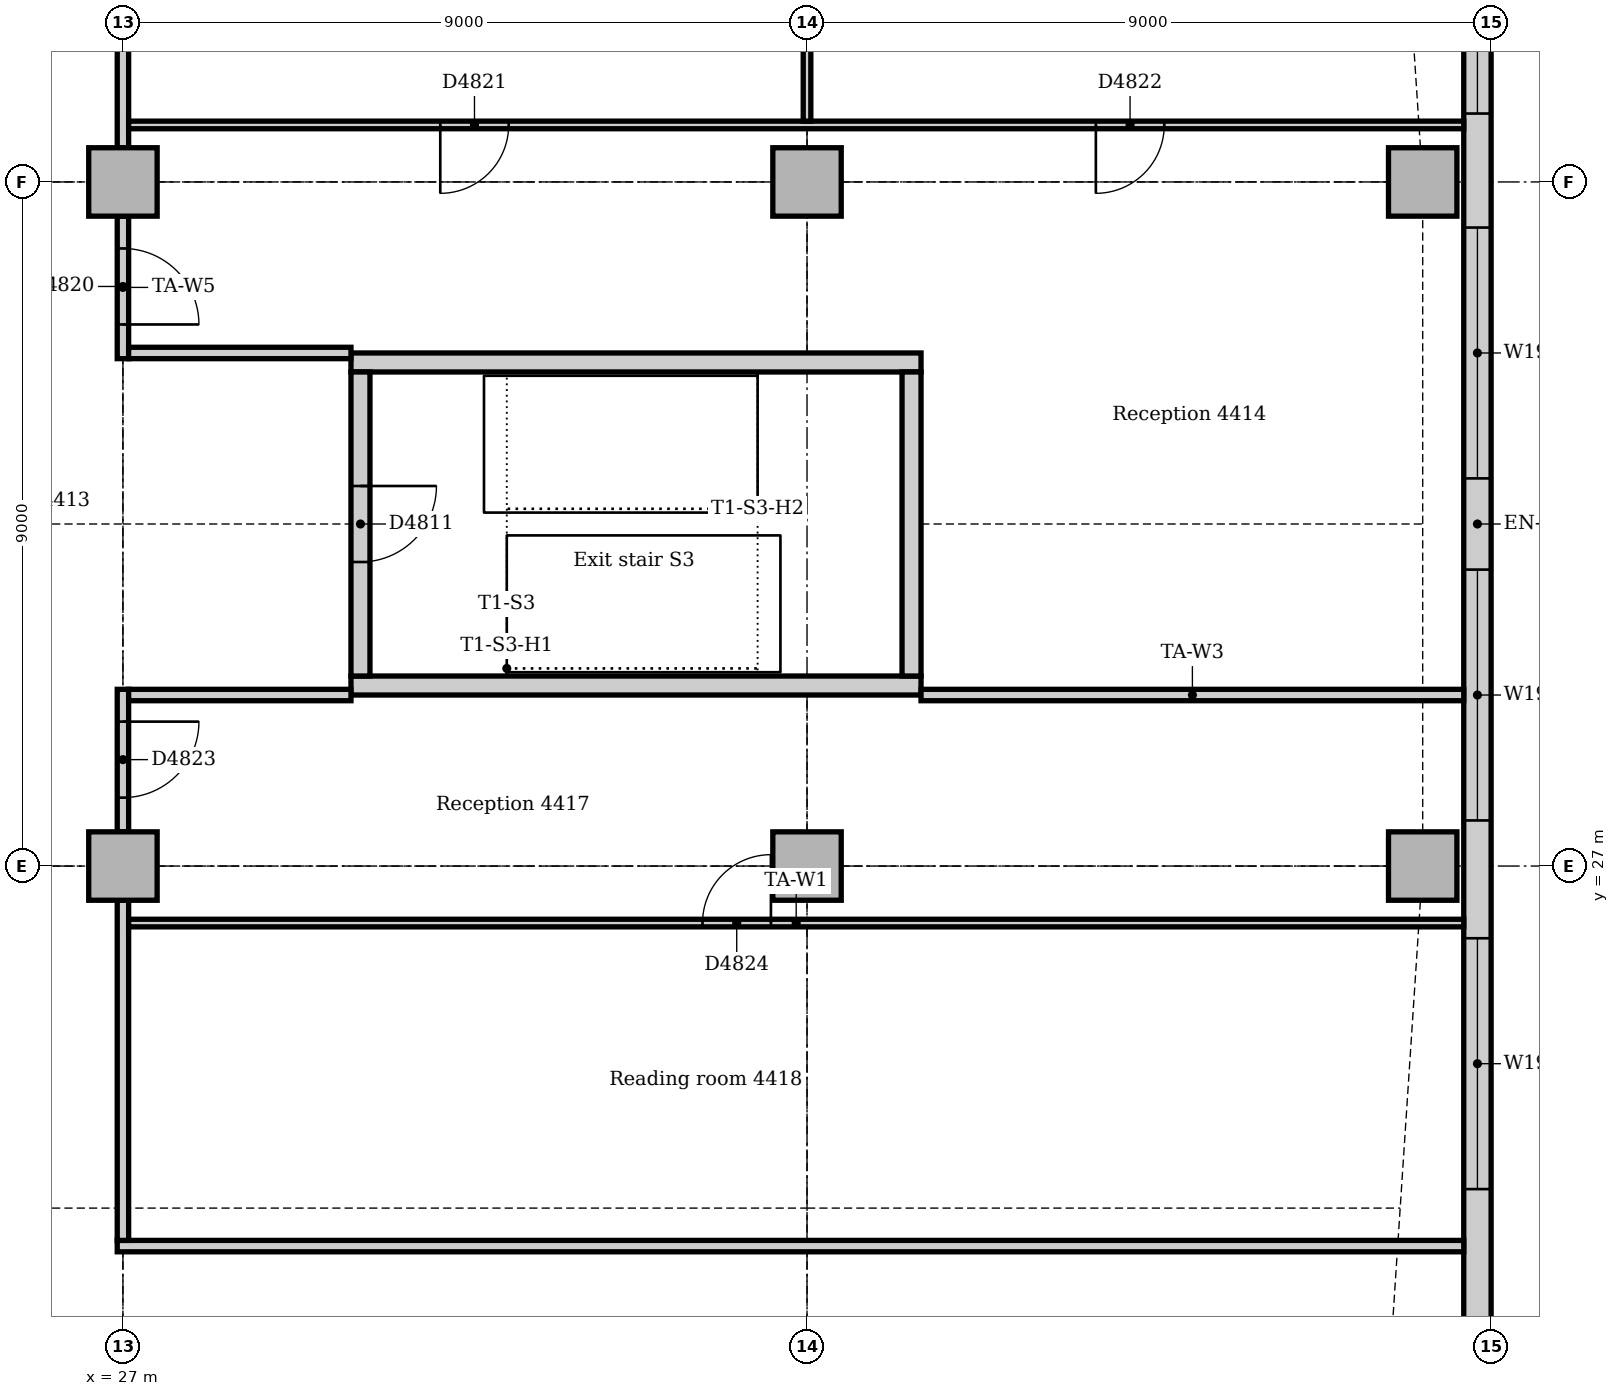
"""IFC4 building model, lengths in metres.
Left out: names, types, materials, properties, quantities, classifications, styles, units other than length and angle.
Written with IfcOpenShell. Run it as: python <this file> out.ifc"""

import sys

from ifc_helpers import new_model, si_unit, direction, frame, frame_2d, origin, origin_2d, place, context, subcontext, project, spatial, rectangle, extrude, element, fill, save


model = new_model("IFC4")
c1 = context("Model", 3, precision=1e-05, world=origin(), true_north=direction((0.0, 1.0)))
c2 = subcontext(c1, "Body", "Model", "MODEL_VIEW")
j1 = project(units=[si_unit("LENGTHUNIT", "METRE"), si_unit("PLANEANGLEUNIT", "RADIAN")], contexts=[c1])
p1 = place(None, origin())
s1 = spatial("IfcSite", under=j1, at=p1, CompositionType="ELEMENT")
p2 = place(p1, origin())
s2 = spatial("IfcBuilding", under=s1, at=p2, CompositionType="ELEMENT")
p3 = place(p2, frame((0.0, 0.0, 185.0)))
s3 = spatial("IfcBuildingStorey", under=s2, at=p3, CompositionType="ELEMENT", Elevation=185.0)
for number, where, z_axis, x_axis in (
    (1, (30.0, 29.375, 0.0), (0.0, 0.0, 1.0), (1.0, 0.0, 0.0)),
    (2, (37.5, 33.625, 0.0), (0.0, 0.0, 1.0), (-1.0, 0.0, 0.0)),
):
    element("IfcWall", number, at=place(p3, frame(where, z_axis=z_axis, x_axis=x_axis)), inside=s3, PredefinedType="SOLIDWALL", context=c2, shape_type="SweptSolid", body=[
        extrude(rectangle(XDim=7.5, YDim=0.25, at=frame_2d((3.75, 0.0))), origin(), (0.0, 0.0, 1.0), 4.0),
    ])
p4 = place(p3, frame((37.375, 29.5, 0.0), z_axis=(0.0, 0.0, 1.0), x_axis=(0.0, 1.0, 0.0)))
e3 = element("IfcWall", 3, at=p4, inside=s3, PredefinedType="SOLIDWALL", context=c2, shape_type="SweptSolid", body=[
    extrude(rectangle(XDim=4.0, YDim=0.25, at=frame_2d((2.0, 0.0))), origin(), (0.0, 0.0, 1.0), 4.0),
])
p5 = place(p3, frame((30.125, 33.5, 0.0), z_axis=(0.0, 0.0, 1.0), x_axis=(0.0, -1.0, 0.0)))
e4 = element("IfcWall", 4, at=p5, inside=s3, PredefinedType="SOLIDWALL", context=c2, shape_type="SweptSolid", body=[
    extrude(rectangle(XDim=4.0, YDim=0.25, at=frame_2d((2.0, 0.0))), origin(), (0.0, 0.0, 1.0), 4.0),
])
p6 = place(p5, frame((1.5, 0.0, 0.0)))
e5 = element("IfcOpeningElement", 5, at=p6, cuts=e4, PredefinedType="OPENING", context=c2, shape_type="SweptSolid", body=[
    extrude(rectangle(XDim=1.0, YDim=2.1, at=frame_2d((0.5, 1.05))), frame((0.0, 0.135, 0.0), z_axis=(0.0, -1.0, 0.0), x_axis=(1.0, 0.0, 0.0)), (0.0, 0.0, 1.0), 0.27),
])
for number, where, z_axis, x_axis in (
    (6, (44.1, 27.0, 0.0), (0.0, 0.0, 1.0), (1.0, 0.0, 0.0)),
    (7, (44.1, 36.0, 0.0), (0.0, 0.0, 1.0), (1.0, 0.0, 0.0)),
    (8, (27.0, 27.0, 0.0), (0.0, 0.0, 1.0), (1.0, 0.0, 0.0)),
    (9, (27.0, 36.0, 0.0), (0.0, 0.0, 1.0), (1.0, 0.0, 0.0)),
    (10, (36.0, 27.0, 0.0), (0.0, 0.0, 1.0), (1.0, 0.0, 0.0)),
    (11, (36.0, 36.0, 0.0), (0.0, 0.0, 1.0), (1.0, 0.0, 0.0)),
):
    element("IfcColumn", number, at=place(p3, frame(where, z_axis=z_axis, x_axis=x_axis)), inside=s3, PredefinedType="COLUMN", context=c2, shape_type="SweptSolid", body=[
        extrude(rectangle(XDim=0.9, YDim=0.9, at=origin_2d()), origin(), (0.0, 0.0, 1.0), 3.85),
    ])
p7 = place(p3, frame((44.82, 19.243, 0.0), z_axis=(0.0, 0.0, 1.0), x_axis=(0.0, 1.0, 0.0)))
e12 = element("IfcWall", 12, at=p7, inside=s3, PredefinedType="STANDARD", context=c2, shape_type="SweptSolid", body=[
    extrude(rectangle(XDim=24.515, YDim=0.36, at=frame_2d((12.257, 0.0))), origin(), (0.0, 0.0, 1.0), 3.85),
])
p8 = place(p7, frame((3.507, 0.0, 0.9)))
e13 = element("IfcOpeningElement", 13, at=p8, cuts=e12, PredefinedType="OPENING", context=c2, shape_type="SweptSolid", body=[
    extrude(rectangle(XDim=3.3, YDim=1.6, at=frame_2d((1.65, 0.8))), frame((0.0, 0.19, 0.0), z_axis=(0.0, -1.0, 0.0), x_axis=(1.0, 0.0, 0.0)), (0.0, 0.0, 1.0), 0.38),
])
p9 = place(p7, frame((8.357, 0.0, 0.9)))
e14 = element("IfcOpeningElement", 14, at=p9, cuts=e12, PredefinedType="OPENING", context=c2, shape_type="SweptSolid", body=[
    extrude(rectangle(XDim=3.3, YDim=1.6, at=frame_2d((1.65, 0.8))), frame((0.0, 0.19, 0.0), z_axis=(0.0, -1.0, 0.0), x_axis=(1.0, 0.0, 0.0)), (0.0, 0.0, 1.0), 0.38),
])
p10 = place(p7, frame((12.857, 0.0, 0.9)))
e15 = element("IfcOpeningElement", 15, at=p10, cuts=e12, PredefinedType="OPENING", context=c2, shape_type="SweptSolid", body=[
    extrude(rectangle(XDim=3.3, YDim=1.6, at=frame_2d((1.65, 0.8))), frame((0.0, 0.19, 0.0), z_axis=(0.0, -1.0, 0.0), x_axis=(1.0, 0.0, 0.0)), (0.0, 0.0, 1.0), 0.38),
])
p11 = place(p7, frame((17.657, 0.0, 0.9)))
e16 = element("IfcOpeningElement", 16, at=p11, cuts=e12, PredefinedType="OPENING", context=c2, shape_type="SweptSolid", body=[
    extrude(rectangle(XDim=3.3, YDim=1.6, at=frame_2d((1.65, 0.8))), frame((0.0, 0.19, 0.0), z_axis=(0.0, -1.0, 0.0), x_axis=(1.0, 0.0, 0.0)), (0.0, 0.0, 1.0), 0.38),
])
p12 = place(p3, frame((26.925, 22.0, 0.0), z_axis=(0.0, 0.0, 1.0), x_axis=(1.0, 0.0, 0.0)))
e17 = element("IfcWall", 17, at=p12, inside=s3, PredefinedType="PARTITIONING", context=c2, shape_type="SweptSolid", body=[
    extrude(rectangle(XDim=17.715, YDim=0.15, at=frame_2d((8.857, 0.0))), origin(), (0.0, 0.0, 1.0), 3.85),
])
p13 = place(p3, frame((27.0, 33.675, 0.0), z_axis=(0.0, 0.0, 1.0), x_axis=(0.0, 1.0, 0.0)))
e18 = element("IfcWall", 18, at=p13, inside=s3, PredefinedType="PARTITIONING", context=c2, shape_type="SweptSolid", body=[
    extrude(rectangle(XDim=1.875, YDim=0.15, at=frame_2d((0.938, 0.0))), origin(), (0.0, 0.0, 1.0), 3.362),
])
p14 = place(p13, frame((0.45, 0.0, 0.0)))
e19 = element("IfcOpeningElement", 19, at=p14, cuts=e18, PredefinedType="OPENING", context=c2, shape_type="SweptSolid", body=[
    extrude(rectangle(XDim=1.0, YDim=2.1, at=frame_2d((0.5, 1.05))), frame((0.0, 0.085, 0.0), z_axis=(0.0, -1.0, 0.0), x_axis=(1.0, 0.0, 0.0)), (0.0, 0.0, 1.0), 0.17),
])
p15 = place(p3, frame((27.0, 36.45, 0.0), z_axis=(0.0, 0.0, 1.0), x_axis=(0.0, 1.0, 0.0)))
e20 = element("IfcWall", 20, at=p15, inside=s3, PredefinedType="PARTITIONING", context=c2, shape_type="SweptSolid", body=[
    extrude(rectangle(XDim=7.2, YDim=0.15, at=frame_2d((3.6, 0.0))), origin(), (0.0, 0.0, 1.0), 3.362),
])
p16 = place(p3, frame((27.0, 22.075, 0.0), z_axis=(0.0, 0.0, 1.0), x_axis=(0.0, 1.0, 0.0)))
e21 = element("IfcWall", 21, at=p16, inside=s3, PredefinedType="PARTITIONING", context=c2, shape_type="SweptSolid", body=[
    extrude(rectangle(XDim=4.475, YDim=0.15, at=frame_2d((2.237, 0.0))), origin(), (0.0, 0.0, 1.0), 3.362),
])
p17 = place(p3, frame((27.0, 27.45, 0.0), z_axis=(0.0, 0.0, 1.0), x_axis=(0.0, 1.0, 0.0)))
e22 = element("IfcWall", 22, at=p17, inside=s3, PredefinedType="PARTITIONING", context=c2, shape_type="SweptSolid", body=[
    extrude(rectangle(XDim=1.875, YDim=0.15, at=frame_2d((0.938, 0.0))), origin(), (0.0, 0.0, 1.0), 3.362),
])
p18 = place(p17, frame((0.45, 0.0, 0.0)))
e23 = element("IfcOpeningElement", 23, at=p18, cuts=e22, PredefinedType="OPENING", context=c2, shape_type="SweptSolid", body=[
    extrude(rectangle(XDim=1.0, YDim=2.1, at=frame_2d((0.5, 1.05))), frame((0.0, 0.085, 0.0), z_axis=(0.0, -1.0, 0.0), x_axis=(1.0, 0.0, 0.0)), (0.0, 0.0, 1.0), 0.17),
])
for number, where, z_axis, x_axis in (
    (24, (27.075, 29.25, 0.0), (0.0, 0.0, 1.0), (1.0, 0.0, 0.0)),
    (25, (27.075, 33.75, 0.0), (0.0, 0.0, 1.0), (1.0, 0.0, 0.0)),
):
    element("IfcWall", number, at=place(p3, frame(where, z_axis=z_axis, x_axis=x_axis)), inside=s3, PredefinedType="PARTITIONING", context=c2, shape_type="SweptSolid", body=[
        extrude(rectangle(XDim=2.925, YDim=0.15, at=frame_2d((1.462, 0.0))), origin(), (0.0, 0.0, 1.0), 3.85),
    ])
p19 = place(p3, frame((37.5, 29.25, 0.0), z_axis=(0.0, 0.0, 1.0), x_axis=(1.0, 0.0, 0.0)))
e26 = element("IfcWall", 26, at=p19, inside=s3, PredefinedType="PARTITIONING", context=c2, shape_type="SweptSolid", body=[
    extrude(rectangle(XDim=7.14, YDim=0.15, at=frame_2d((3.57, 0.0))), origin(), (0.0, 0.0, 1.0), 3.85),
])
p20 = place(p3, frame((27.075, 26.25, 0.0), z_axis=(0.0, 0.0, 1.0), x_axis=(1.0, 0.0, 0.0)))
e27 = element("IfcWall", 27, at=p20, inside=s3, PredefinedType="PARTITIONING", context=c2, shape_type="SweptSolid", body=[
    extrude(rectangle(XDim=17.565, YDim=0.1, at=frame_2d((8.783, 0.0))), origin(), (0.0, 0.0, 1.0), 3.85),
])
p21 = place(p20, frame((7.55, 0.0, 0.0)))
e28 = element("IfcOpeningElement", 28, at=p21, cuts=e27, PredefinedType="OPENING", context=c2, shape_type="SweptSolid", body=[
    extrude(rectangle(XDim=0.9, YDim=2.1, at=frame_2d((0.45, 1.05))), frame((0.0, 0.06, 0.0), z_axis=(0.0, -1.0, 0.0), x_axis=(1.0, 0.0, 0.0)), (0.0, 0.0, 1.0), 0.12),
])
p22 = place(p3, frame((27.075, 36.75, 0.0), z_axis=(0.0, 0.0, 1.0), x_axis=(1.0, 0.0, 0.0)))
e29 = element("IfcWall", 29, at=p22, inside=s3, PredefinedType="PARTITIONING", context=c2, shape_type="SweptSolid", body=[
    extrude(rectangle(XDim=17.565, YDim=0.1, at=frame_2d((8.783, 0.0))), origin(), (0.0, 0.0, 1.0), 3.85),
])
p23 = place(p22, frame((4.1, 0.0, 0.0)))
e30 = element("IfcOpeningElement", 30, at=p23, cuts=e29, PredefinedType="OPENING", context=c2, shape_type="SweptSolid", body=[
    extrude(rectangle(XDim=0.9, YDim=2.1, at=frame_2d((0.45, 1.05))), frame((0.0, 0.06, 0.0), z_axis=(0.0, -1.0, 0.0), x_axis=(1.0, 0.0, 0.0)), (0.0, 0.0, 1.0), 0.12),
])
p24 = place(p22, frame((12.725, 0.0, 0.0)))
e31 = element("IfcOpeningElement", 31, at=p24, cuts=e29, PredefinedType="OPENING", context=c2, shape_type="SweptSolid", body=[
    extrude(rectangle(XDim=0.9, YDim=2.1, at=frame_2d((0.45, 1.05))), frame((0.0, 0.06, 0.0), z_axis=(0.0, -1.0, 0.0), x_axis=(1.0, 0.0, 0.0)), (0.0, 0.0, 1.0), 0.12),
])
p25 = place(p3, frame((36.0, 36.8, 0.0), z_axis=(0.0, 0.0, 1.0), x_axis=(0.0, 1.0, 0.0)))
e32 = element("IfcWall", 32, at=p25, inside=s3, PredefinedType="PARTITIONING", context=c2, shape_type="SweptSolid", body=[
    extrude(rectangle(XDim=6.85, YDim=0.1, at=frame_2d((3.425, 0.0))), origin(), (0.0, 0.0, 1.0), 3.362),
])
p26 = place(p8, origin())
e33 = element("IfcWindow", 33, at=p26, inside=s3, PartitioningType="SINGLE_PANEL", PredefinedType="WINDOW", context=c2, shape_type="SweptSolid", body=[
    extrude(rectangle(XDim=3.3, YDim=1.6, at=frame_2d((1.65, 0.8))), frame((0.0, 0.13, 0.0), z_axis=(0.0, -1.0, 0.0), x_axis=(1.0, 0.0, 0.0)), (0.0, 0.0, 1.0), 0.06),
])
fill(e13, e33)
p27 = place(p9, origin())
e34 = element("IfcWindow", 34, at=p27, inside=s3, PartitioningType="SINGLE_PANEL", PredefinedType="WINDOW", context=c2, shape_type="SweptSolid", body=[
    extrude(rectangle(XDim=3.3, YDim=1.6, at=frame_2d((1.65, 0.8))), frame((0.0, 0.13, 0.0), z_axis=(0.0, -1.0, 0.0), x_axis=(1.0, 0.0, 0.0)), (0.0, 0.0, 1.0), 0.06),
])
fill(e14, e34)
p28 = place(p10, origin())
e35 = element("IfcWindow", 35, at=p28, inside=s3, PartitioningType="SINGLE_PANEL", PredefinedType="WINDOW", context=c2, shape_type="SweptSolid", body=[
    extrude(rectangle(XDim=3.3, YDim=1.6, at=frame_2d((1.65, 0.8))), frame((0.0, 0.13, 0.0), z_axis=(0.0, -1.0, 0.0), x_axis=(1.0, 0.0, 0.0)), (0.0, 0.0, 1.0), 0.06),
])
fill(e15, e35)
p29 = place(p11, origin())
e36 = element("IfcWindow", 36, at=p29, inside=s3, PartitioningType="SINGLE_PANEL", PredefinedType="WINDOW", context=c2, shape_type="SweptSolid", body=[
    extrude(rectangle(XDim=3.3, YDim=1.6, at=frame_2d((1.65, 0.8))), frame((0.0, 0.13, 0.0), z_axis=(0.0, -1.0, 0.0), x_axis=(1.0, 0.0, 0.0)), (0.0, 0.0, 1.0), 0.06),
])
fill(e16, e36)
p30 = place(p6, origin())
e37 = element("IfcDoor", 37, at=p30, inside=s3, OperationType="SINGLE_SWING_LEFT", PredefinedType="DOOR", context=c2, shape_type="SweptSolid", body=[
    extrude(rectangle(XDim=1.0, YDim=2.1, at=frame_2d((0.5, 1.05))), frame((0.0, 0.025, 0.0), z_axis=(0.0, -1.0, 0.0), x_axis=(1.0, 0.0, 0.0)), (0.0, 0.0, 1.0), 0.05),
])
fill(e5, e37)
p31 = place(p14, frame((1.0, 0.0, 0.0), z_axis=(0.0, 0.0, 1.0), x_axis=(-1.0, 0.0, 0.0)))
e38 = element("IfcDoor", 38, at=p31, inside=s3, OperationType="SINGLE_SWING_RIGHT", PredefinedType="DOOR", context=c2, shape_type="SweptSolid", body=[
    extrude(rectangle(XDim=1.0, YDim=2.1, at=frame_2d((0.5, 1.05))), frame((0.0, 0.025, 0.0), z_axis=(0.0, -1.0, 0.0), x_axis=(1.0, 0.0, 0.0)), (0.0, 0.0, 1.0), 0.05),
])
fill(e19, e38)
p32 = place(p23, frame((0.9, 0.0, 0.0), z_axis=(0.0, 0.0, 1.0), x_axis=(-1.0, 0.0, 0.0)))
e39 = element("IfcDoor", 39, at=p32, inside=s3, OperationType="SINGLE_SWING_RIGHT", PredefinedType="DOOR", context=c2, shape_type="SweptSolid", body=[
    extrude(rectangle(XDim=0.9, YDim=2.1, at=frame_2d((0.45, 1.05))), frame((0.0, 0.025, 0.0), z_axis=(0.0, -1.0, 0.0), x_axis=(1.0, 0.0, 0.0)), (0.0, 0.0, 1.0), 0.05),
])
fill(e30, e39)
p33 = place(p24, frame((0.9, 0.0, 0.0), z_axis=(0.0, 0.0, 1.0), x_axis=(-1.0, 0.0, 0.0)))
e40 = element("IfcDoor", 40, at=p33, inside=s3, OperationType="SINGLE_SWING_RIGHT", PredefinedType="DOOR", context=c2, shape_type="SweptSolid", body=[
    extrude(rectangle(XDim=0.9, YDim=2.1, at=frame_2d((0.45, 1.05))), frame((0.0, 0.025, 0.0), z_axis=(0.0, -1.0, 0.0), x_axis=(1.0, 0.0, 0.0)), (0.0, 0.0, 1.0), 0.05),
])
fill(e31, e40)
p34 = place(p18, frame((1.0, 0.0, 0.0), z_axis=(0.0, 0.0, 1.0), x_axis=(-1.0, 0.0, 0.0)))
e41 = element("IfcDoor", 41, at=p34, inside=s3, OperationType="SINGLE_SWING_LEFT", PredefinedType="DOOR", context=c2, shape_type="SweptSolid", body=[
    extrude(rectangle(XDim=1.0, YDim=2.1, at=frame_2d((0.5, 1.05))), frame((0.0, 0.025, 0.0), z_axis=(0.0, -1.0, 0.0), x_axis=(1.0, 0.0, 0.0)), (0.0, 0.0, 1.0), 0.05),
])
fill(e23, e41)
p35 = place(p21, origin())
e42 = element("IfcDoor", 42, at=p35, inside=s3, OperationType="SINGLE_SWING_RIGHT", PredefinedType="DOOR", context=c2, shape_type="SweptSolid", body=[
    extrude(rectangle(XDim=0.9, YDim=2.1, at=frame_2d((0.45, 1.05))), frame((0.0, 0.025, 0.0), z_axis=(0.0, -1.0, 0.0), x_axis=(1.0, 0.0, 0.0)), (0.0, 0.0, 1.0), 0.05),
])
fill(e28, e42)
save(model, sys.argv[1])
